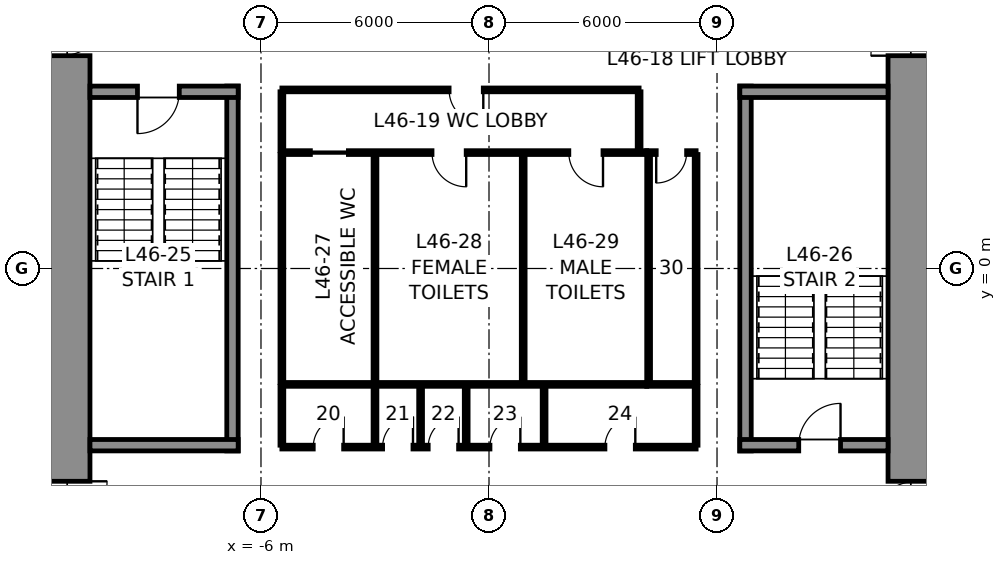
"""IFC4 building model, lengths in metres.
Left out: names, types, materials, properties, quantities, classifications, styles, units other than length and angle.
Written with IfcOpenShell. Run it as: python <this file> out.ifc"""

import sys

from ifc_helpers import new_model, si_unit, direction, frame, frame_2d, origin, place, context, subcontext, project, spatial, rectangle, extrude, element, fill, save


model = new_model("IFC4")
c1 = context("Model", 3, precision=1e-05, world=origin(), true_north=direction((0.0, 1.0)))
c2 = subcontext(c1, "Body", "Model", "MODEL_VIEW")
j1 = project(units=[si_unit("LENGTHUNIT", "METRE"), si_unit("PLANEANGLEUNIT", "RADIAN")], contexts=[c1])
p1 = place(None, origin())
s1 = spatial("IfcSite", under=j1, at=p1, CompositionType="ELEMENT")
p2 = place(p1, origin())
s2 = spatial("IfcBuilding", under=s1, at=p2, CompositionType="ELEMENT")
p3 = place(p2, frame((0.0, 0.0, 213.8)))
s3 = spatial("IfcBuildingStorey", under=s2, at=p3, CompositionType="ELEMENT", Elevation=213.8)
p4 = place(p3, frame((11.25, 10.5, 0.0), z_axis=(0.0, 0.0, 1.0), x_axis=(0.0, -1.0, 0.0)))
e1 = element("IfcWall", 1, at=p4, inside=s3, PredefinedType="SHEAR", context=c2, shape_type="SweptSolid", body=[
    extrude(rectangle(XDim=21.0, YDim=1.5, at=frame_2d((10.5, 0.0))), origin(), (0.0, 0.0, 1.0), 4.0),
])
p5 = place(p4, frame((3.7, 0.0, 0.0)))
e2 = element("IfcOpeningElement", 2, at=p5, cuts=e1, PredefinedType="OPENING", context=c2, shape_type="SweptSolid", body=[
    extrude(rectangle(XDim=1.2, YDim=2.3, at=frame_2d((0.6, 1.15))), frame((0.0, 0.76, 0.0), z_axis=(0.0, -1.0, 0.0), x_axis=(1.0, 0.0, 0.0)), (0.0, 0.0, 1.0), 1.52),
])
p6 = place(p4, frame((16.1, 0.0, 0.0)))
e3 = element("IfcOpeningElement", 3, at=p6, cuts=e1, PredefinedType="OPENING", context=c2, shape_type="SweptSolid", body=[
    extrude(rectangle(XDim=1.2, YDim=2.3, at=frame_2d((0.6, 1.15))), frame((0.0, 0.76, 0.0), z_axis=(0.0, -1.0, 0.0), x_axis=(1.0, 0.0, 0.0)), (0.0, 0.0, 1.0), 1.52),
])
p7 = place(p3, frame((-11.25, -10.5, 0.0), z_axis=(0.0, 0.0, 1.0), x_axis=(0.0, 1.0, 0.0)))
e4 = element("IfcWall", 4, at=p7, inside=s3, PredefinedType="SHEAR", context=c2, shape_type="SweptSolid", body=[
    extrude(rectangle(XDim=21.0, YDim=1.5, at=frame_2d((10.5, 0.0))), origin(), (0.0, 0.0, 1.0), 4.0),
])
p8 = place(p7, frame((16.1, 0.0, 0.0)))
e5 = element("IfcOpeningElement", 5, at=p8, cuts=e4, PredefinedType="OPENING", context=c2, shape_type="SweptSolid", body=[
    extrude(rectangle(XDim=1.2, YDim=2.3, at=frame_2d((0.6, 1.15))), frame((0.0, 0.76, 0.0), z_axis=(0.0, -1.0, 0.0), x_axis=(1.0, 0.0, 0.0)), (0.0, 0.0, 1.0), 1.52),
])
p9 = place(p7, frame((3.7, 0.0, 0.0)))
e6 = element("IfcOpeningElement", 6, at=p9, cuts=e4, PredefinedType="OPENING", context=c2, shape_type="SweptSolid", body=[
    extrude(rectangle(XDim=1.2, YDim=2.3, at=frame_2d((0.6, 1.15))), frame((0.0, 0.76, 0.0), z_axis=(0.0, -1.0, 0.0), x_axis=(1.0, 0.0, 0.0)), (0.0, 0.0, 1.0), 1.52),
])
p10 = place(p3, frame((-6.75, -4.8, 0.0), z_axis=(0.0, 0.0, 1.0), x_axis=(0.0, 1.0, 0.0)))
e7 = element("IfcWall", 7, at=p10, inside=s3, PredefinedType="SOLIDWALL", context=c2, shape_type="SweptSolid", body=[
    extrude(rectangle(XDim=9.6, YDim=0.3, at=frame_2d((4.8, 0.0))), origin(), (0.0, 0.0, 1.0), 3.75),
])
p11 = place(p3, frame((-10.5, 4.65, 0.0), z_axis=(0.0, 0.0, 1.0), x_axis=(1.0, 0.0, 0.0)))
e8 = element("IfcWall", 8, at=p11, inside=s3, PredefinedType="SOLIDWALL", context=c2, shape_type="SweptSolid", body=[
    extrude(rectangle(XDim=3.9, YDim=0.3, at=frame_2d((1.95, 0.0))), origin(), (0.0, 0.0, 1.0), 3.75),
])
p12 = place(p11, frame((1.25, 0.0, 0.0)))
e9 = element("IfcOpeningElement", 9, at=p12, cuts=e8, PredefinedType="OPENING", context=c2, shape_type="SweptSolid", body=[
    extrude(rectangle(XDim=1.1, YDim=2.3, at=frame_2d((0.55, 1.15))), frame((0.0, 0.16, 0.0), z_axis=(0.0, -1.0, 0.0), x_axis=(1.0, 0.0, 0.0)), (0.0, 0.0, 1.0), 0.32),
])
p13 = place(p3, frame((-6.6, -4.65, 0.0), z_axis=(0.0, 0.0, 1.0), x_axis=(-1.0, 0.0, 0.0)))
e10 = element("IfcWall", 10, at=p13, inside=s3, PredefinedType="SOLIDWALL", context=c2, shape_type="SweptSolid", body=[
    extrude(rectangle(XDim=3.9, YDim=0.3, at=frame_2d((1.95, 0.0))), origin(), (0.0, 0.0, 1.0), 3.75),
])
p14 = place(p3, frame((6.75, -4.8, 0.0), z_axis=(0.0, 0.0, 1.0), x_axis=(0.0, 1.0, 0.0)))
e11 = element("IfcWall", 11, at=p14, inside=s3, PredefinedType="SOLIDWALL", context=c2, shape_type="SweptSolid", body=[
    extrude(rectangle(XDim=9.6, YDim=0.3, at=frame_2d((4.8, 0.0))), origin(), (0.0, 0.0, 1.0), 3.75),
])
p15 = place(p3, frame((6.6, 4.65, 0.0), z_axis=(0.0, 0.0, 1.0), x_axis=(1.0, 0.0, 0.0)))
e12 = element("IfcWall", 12, at=p15, inside=s3, PredefinedType="SOLIDWALL", context=c2, shape_type="SweptSolid", body=[
    extrude(rectangle(XDim=3.9, YDim=0.3, at=frame_2d((1.95, 0.0))), origin(), (0.0, 0.0, 1.0), 3.75),
])
p16 = place(p3, frame((10.5, -4.65, 0.0), z_axis=(0.0, 0.0, 1.0), x_axis=(-1.0, 0.0, 0.0)))
e13 = element("IfcWall", 13, at=p16, inside=s3, PredefinedType="SOLIDWALL", context=c2, shape_type="SweptSolid", body=[
    extrude(rectangle(XDim=3.9, YDim=0.3, at=frame_2d((1.95, 0.0))), origin(), (0.0, 0.0, 1.0), 3.75),
])
p17 = place(p16, frame((1.25, 0.0, 0.0)))
e14 = element("IfcOpeningElement", 14, at=p17, cuts=e13, PredefinedType="OPENING", context=c2, shape_type="SweptSolid", body=[
    extrude(rectangle(XDim=1.1, YDim=2.3, at=frame_2d((0.55, 1.15))), frame((0.0, 0.16, 0.0), z_axis=(0.0, -1.0, 0.0), x_axis=(1.0, 0.0, 0.0)), (0.0, 0.0, 1.0), 0.32),
])
p18 = place(p3, frame((-5.45, 3.05, 0.0), z_axis=(0.0, 0.0, 1.0), x_axis=(1.0, 0.0, 0.0)))
e15 = element("IfcWall", 15, at=p18, inside=s3, PredefinedType="PARTITIONING", context=c2, shape_type="SweptSolid", body=[
    extrude(rectangle(XDim=9.6, YDim=0.1, at=frame_2d((4.8, 0.0))), origin(), (0.0, 0.0, 1.0), 3.75),
])
p19 = place(p18, frame((0.75, 0.0, 0.0)))
e16 = element("IfcOpeningElement", 16, at=p19, cuts=e15, PredefinedType="OPENING", context=c2, shape_type="SweptSolid", body=[
    extrude(rectangle(XDim=1.0, YDim=2.3, at=frame_2d((0.5, 1.15))), frame((0.0, 0.06, 0.0), z_axis=(0.0, -1.0, 0.0), x_axis=(1.0, 0.0, 0.0)), (0.0, 0.0, 1.0), 0.12),
])
p20 = place(p18, frame((3.95, 0.0, 0.0)))
e17 = element("IfcOpeningElement", 17, at=p20, cuts=e15, PredefinedType="OPENING", context=c2, shape_type="SweptSolid", body=[
    extrude(rectangle(XDim=0.9, YDim=2.3, at=frame_2d((0.45, 1.15))), frame((0.0, 0.06, 0.0), z_axis=(0.0, -1.0, 0.0), x_axis=(1.0, 0.0, 0.0)), (0.0, 0.0, 1.0), 0.12),
])
p21 = place(p18, frame((7.55, 0.0, 0.0)))
e18 = element("IfcOpeningElement", 18, at=p21, cuts=e15, PredefinedType="OPENING", context=c2, shape_type="SweptSolid", body=[
    extrude(rectangle(XDim=0.9, YDim=2.3, at=frame_2d((0.45, 1.15))), frame((0.0, 0.06, 0.0), z_axis=(0.0, -1.0, 0.0), x_axis=(1.0, 0.0, 0.0)), (0.0, 0.0, 1.0), 0.12),
])
p22 = place(p3, frame((4.15, 3.05, 0.0), z_axis=(0.0, 0.0, 1.0), x_axis=(1.0, 0.0, 0.0)))
e19 = element("IfcWall", 19, at=p22, inside=s3, PredefinedType="PARTITIONING", context=c2, shape_type="SweptSolid", body=[
    extrude(rectangle(XDim=1.3, YDim=0.1, at=frame_2d((0.65, 0.0))), origin(), (0.0, 0.0, 1.0), 3.75),
])
p23 = place(p22, frame((0.25, 0.0, 0.0)))
e20 = element("IfcOpeningElement", 20, at=p23, cuts=e19, PredefinedType="OPENING", context=c2, shape_type="SweptSolid", body=[
    extrude(rectangle(XDim=0.8, YDim=2.3, at=frame_2d((0.4, 1.15))), frame((0.0, 0.06, 0.0), z_axis=(0.0, -1.0, 0.0), x_axis=(1.0, 0.0, 0.0)), (0.0, 0.0, 1.0), 0.12),
])
p24 = place(p3, frame((4.15, -3.05, 0.0), z_axis=(0.0, 0.0, 1.0), x_axis=(-1.0, 0.0, 0.0)))
e21 = element("IfcWall", 21, at=p24, inside=s3, PredefinedType="PARTITIONING", context=c2, shape_type="SweptSolid", body=[
    extrude(rectangle(XDim=9.6, YDim=0.1, at=frame_2d((4.8, 0.0))), origin(), (0.0, 0.0, 1.0), 3.75),
])
p25 = place(p3, frame((5.45, -3.05, 0.0), z_axis=(0.0, 0.0, 1.0), x_axis=(-1.0, 0.0, 0.0)))
e22 = element("IfcWall", 22, at=p25, inside=s3, PredefinedType="PARTITIONING", context=c2, shape_type="SweptSolid", body=[
    extrude(rectangle(XDim=1.3, YDim=0.1, at=frame_2d((0.65, 0.0))), origin(), (0.0, 0.0, 1.0), 3.75),
])
for number, where, z_axis, x_axis in (
    (23, (5.45, 3.0, 0.0), (0.0, 0.0, 1.0), (0.0, -1.0, 0.0)),
    (24, (-5.45, -3.0, 0.0), (0.0, 0.0, 1.0), (0.0, 1.0, 0.0)),
    (25, (-3.0, -3.0, 0.0), (0.0, 0.0, 1.0), (0.0, 1.0, 0.0)),
    (26, (0.9, -3.0, 0.0), (0.0, 0.0, 1.0), (0.0, 1.0, 0.0)),
    (27, (4.2, -3.0, 0.0), (0.0, 0.0, 1.0), (0.0, 1.0, 0.0)),
):
    element("IfcWall", number, at=place(p3, frame(where, z_axis=z_axis, x_axis=x_axis)), inside=s3, PredefinedType="PARTITIONING", context=c2, shape_type="SweptSolid", body=[
        extrude(rectangle(XDim=6.0, YDim=0.1, at=frame_2d((3.0, 0.0))), origin(), (0.0, 0.0, 1.0), 3.75),
    ])
p26 = place(p3, frame((-5.45, 4.7, 0.0), z_axis=(0.0, 0.0, 1.0), x_axis=(1.0, 0.0, 0.0)))
e28 = element("IfcWall", 28, at=p26, inside=s3, PredefinedType="PARTITIONING", context=c2, shape_type="SweptSolid", body=[
    extrude(rectangle(XDim=9.4, YDim=0.1, at=frame_2d((4.7, 0.0))), origin(), (0.0, 0.0, 1.0), 3.75),
])
p27 = place(p26, frame((4.4, 0.0, 0.0)))
e29 = element("IfcOpeningElement", 29, at=p27, cuts=e28, PredefinedType="OPENING", context=c2, shape_type="SweptSolid", body=[
    extrude(rectangle(XDim=0.9, YDim=2.3, at=frame_2d((0.45, 1.15))), frame((0.0, 0.06, 0.0), z_axis=(0.0, -1.0, 0.0), x_axis=(1.0, 0.0, 0.0)), (0.0, 0.0, 1.0), 0.12),
])
for number, where, z_axis, x_axis in (
    (30, (-5.45, 3.1, 0.0), (0.0, 0.0, 1.0), (0.0, 1.0, 0.0)),
    (31, (3.95, 3.1, 0.0), (0.0, 0.0, 1.0), (0.0, 1.0, 0.0)),
):
    element("IfcWall", number, at=place(p3, frame(where, z_axis=z_axis, x_axis=x_axis)), inside=s3, PredefinedType="PARTITIONING", context=c2, shape_type="SweptSolid", body=[
        extrude(rectangle(XDim=1.55, YDim=0.1, at=frame_2d((0.775, 0.0))), origin(), (0.0, 0.0, 1.0), 3.75),
    ])
p28 = place(p3, frame((5.45, -4.7, 0.0), z_axis=(0.0, 0.0, 1.0), x_axis=(-1.0, 0.0, 0.0)))
e32 = element("IfcWall", 32, at=p28, inside=s3, PredefinedType="PARTITIONING", context=c2, shape_type="SweptSolid", body=[
    extrude(rectangle(XDim=10.9, YDim=0.1, at=frame_2d((5.45, 0.0))), origin(), (0.0, 0.0, 1.0), 3.75),
])
p29 = place(p28, frame((9.275, 0.0, 0.0)))
e33 = element("IfcOpeningElement", 33, at=p29, cuts=e32, PredefinedType="OPENING", context=c2, shape_type="SweptSolid", body=[
    extrude(rectangle(XDim=0.8, YDim=2.3, at=frame_2d((0.4, 1.15))), frame((0.0, 0.06, 0.0), z_axis=(0.0, -1.0, 0.0), x_axis=(1.0, 0.0, 0.0)), (0.0, 0.0, 1.0), 0.12),
])
p30 = place(p28, frame((7.45, 0.0, 0.0)))
e34 = element("IfcOpeningElement", 34, at=p30, cuts=e32, PredefinedType="OPENING", context=c2, shape_type="SweptSolid", body=[
    extrude(rectangle(XDim=0.8, YDim=2.3, at=frame_2d((0.4, 1.15))), frame((0.0, 0.06, 0.0), z_axis=(0.0, -1.0, 0.0), x_axis=(1.0, 0.0, 0.0)), (0.0, 0.0, 1.0), 0.12),
])
p31 = place(p28, frame((6.25, 0.0, 0.0)))
e35 = element("IfcOpeningElement", 35, at=p31, cuts=e32, PredefinedType="OPENING", context=c2, shape_type="SweptSolid", body=[
    extrude(rectangle(XDim=0.8, YDim=2.3, at=frame_2d((0.4, 1.15))), frame((0.0, 0.06, 0.0), z_axis=(0.0, -1.0, 0.0), x_axis=(1.0, 0.0, 0.0)), (0.0, 0.0, 1.0), 0.12),
])
p32 = place(p28, frame((4.625, 0.0, 0.0)))
e36 = element("IfcOpeningElement", 36, at=p32, cuts=e32, PredefinedType="OPENING", context=c2, shape_type="SweptSolid", body=[
    extrude(rectangle(XDim=0.8, YDim=2.3, at=frame_2d((0.4, 1.15))), frame((0.0, 0.06, 0.0), z_axis=(0.0, -1.0, 0.0), x_axis=(1.0, 0.0, 0.0)), (0.0, 0.0, 1.0), 0.12),
])
p33 = place(p28, frame((1.6, 0.0, 0.0)))
e37 = element("IfcOpeningElement", 37, at=p33, cuts=e32, PredefinedType="OPENING", context=c2, shape_type="SweptSolid", body=[
    extrude(rectangle(XDim=0.8, YDim=2.3, at=frame_2d((0.4, 1.15))), frame((0.0, 0.06, 0.0), z_axis=(0.0, -1.0, 0.0), x_axis=(1.0, 0.0, 0.0)), (0.0, 0.0, 1.0), 0.12),
])
for number, where, z_axis, x_axis in (
    (38, (-5.45, -3.1, 0.0), (0.0, 0.0, 1.0), (0.0, -1.0, 0.0)),
    (39, (5.45, -3.1, 0.0), (0.0, 0.0, 1.0), (0.0, -1.0, 0.0)),
    (40, (-3.0, -3.1, 0.0), (0.0, 0.0, 1.0), (0.0, -1.0, 0.0)),
    (41, (-1.8, -3.1, 0.0), (0.0, 0.0, 1.0), (0.0, -1.0, 0.0)),
    (42, (-0.6, -3.1, 0.0), (0.0, 0.0, 1.0), (0.0, -1.0, 0.0)),
    (43, (1.45, -3.1, 0.0), (0.0, 0.0, 1.0), (0.0, -1.0, 0.0)),
):
    element("IfcWall", number, at=place(p3, frame(where, z_axis=z_axis, x_axis=x_axis)), inside=s3, PredefinedType="PARTITIONING", context=c2, shape_type="SweptSolid", body=[
        extrude(rectangle(XDim=1.55, YDim=0.1, at=frame_2d((0.775, 0.0))), origin(), (0.0, 0.0, 1.0), 3.75),
    ])
p34 = place(p12, frame((1.1, 0.0, 0.0), z_axis=(0.0, 0.0, 1.0), x_axis=(-1.0, 0.0, 0.0)))
e44 = element("IfcDoor", 44, at=p34, inside=s3, OperationType="SINGLE_SWING_RIGHT", PredefinedType="DOOR", context=c2, shape_type="SweptSolid", body=[
    extrude(rectangle(XDim=1.1, YDim=2.3, at=frame_2d((0.55, 1.15))), frame((0.0, 0.025, 0.0), z_axis=(0.0, -1.0, 0.0), x_axis=(1.0, 0.0, 0.0)), (0.0, 0.0, 1.0), 0.05),
])
fill(e9, e44)
p35 = place(p17, frame((1.1, 0.0, 0.0), z_axis=(0.0, 0.0, 1.0), x_axis=(-1.0, 0.0, 0.0)))
e45 = element("IfcDoor", 45, at=p35, inside=s3, OperationType="SINGLE_SWING_RIGHT", PredefinedType="DOOR", context=c2, shape_type="SweptSolid", body=[
    extrude(rectangle(XDim=1.1, YDim=2.3, at=frame_2d((0.55, 1.15))), frame((0.0, 0.025, 0.0), z_axis=(0.0, -1.0, 0.0), x_axis=(1.0, 0.0, 0.0)), (0.0, 0.0, 1.0), 0.05),
])
fill(e14, e45)
p36 = place(p19, frame((1.0, 0.0, 0.0), z_axis=(0.0, 0.0, 1.0), x_axis=(-1.0, 0.0, 0.0)))
e46 = element("IfcDoor", 46, at=p36, inside=s3, OperationType="SLIDING_TO_LEFT", PredefinedType="DOOR", context=c2, shape_type="SweptSolid", body=[
    extrude(rectangle(XDim=1.0, YDim=2.3, at=frame_2d((0.5, 1.15))), frame((0.0, 0.025, 0.0), z_axis=(0.0, -1.0, 0.0), x_axis=(1.0, 0.0, 0.0)), (0.0, 0.0, 1.0), 0.05),
])
fill(e16, e46)
p37 = place(p20, frame((0.9, 0.0, 0.0), z_axis=(0.0, 0.0, 1.0), x_axis=(-1.0, 0.0, 0.0)))
e47 = element("IfcDoor", 47, at=p37, inside=s3, OperationType="SINGLE_SWING_LEFT", PredefinedType="DOOR", context=c2, shape_type="SweptSolid", body=[
    extrude(rectangle(XDim=0.9, YDim=2.3, at=frame_2d((0.45, 1.15))), frame((0.0, 0.025, 0.0), z_axis=(0.0, -1.0, 0.0), x_axis=(1.0, 0.0, 0.0)), (0.0, 0.0, 1.0), 0.05),
])
fill(e17, e47)
p38 = place(p21, frame((0.9, 0.0, 0.0), z_axis=(0.0, 0.0, 1.0), x_axis=(-1.0, 0.0, 0.0)))
e48 = element("IfcDoor", 48, at=p38, inside=s3, OperationType="SINGLE_SWING_LEFT", PredefinedType="DOOR", context=c2, shape_type="SweptSolid", body=[
    extrude(rectangle(XDim=0.9, YDim=2.3, at=frame_2d((0.45, 1.15))), frame((0.0, 0.025, 0.0), z_axis=(0.0, -1.0, 0.0), x_axis=(1.0, 0.0, 0.0)), (0.0, 0.0, 1.0), 0.05),
])
fill(e18, e48)
p39 = place(p23, frame((0.8, 0.0, 0.0), z_axis=(0.0, 0.0, 1.0), x_axis=(-1.0, 0.0, 0.0)))
e49 = element("IfcDoor", 49, at=p39, inside=s3, OperationType="SINGLE_SWING_RIGHT", PredefinedType="DOOR", context=c2, shape_type="SweptSolid", body=[
    extrude(rectangle(XDim=0.8, YDim=2.3, at=frame_2d((0.4, 1.15))), frame((0.0, 0.025, 0.0), z_axis=(0.0, -1.0, 0.0), x_axis=(1.0, 0.0, 0.0)), (0.0, 0.0, 1.0), 0.05),
])
fill(e20, e49)
p40 = place(p27, frame((0.9, 0.0, 0.0), z_axis=(0.0, 0.0, 1.0), x_axis=(-1.0, 0.0, 0.0)))
e50 = element("IfcDoor", 50, at=p40, inside=s3, OperationType="SINGLE_SWING_LEFT", PredefinedType="DOOR", context=c2, shape_type="SweptSolid", body=[
    extrude(rectangle(XDim=0.9, YDim=2.3, at=frame_2d((0.45, 1.15))), frame((0.0, 0.025, 0.0), z_axis=(0.0, -1.0, 0.0), x_axis=(1.0, 0.0, 0.0)), (0.0, 0.0, 1.0), 0.05),
])
fill(e29, e50)
p41 = place(p29, frame((0.8, 0.0, 0.0), z_axis=(0.0, 0.0, 1.0), x_axis=(-1.0, 0.0, 0.0)))
e51 = element("IfcDoor", 51, at=p41, inside=s3, OperationType="SINGLE_SWING_RIGHT", PredefinedType="DOOR", context=c2, shape_type="SweptSolid", body=[
    extrude(rectangle(XDim=0.8, YDim=2.3, at=frame_2d((0.4, 1.15))), frame((0.0, 0.025, 0.0), z_axis=(0.0, -1.0, 0.0), x_axis=(1.0, 0.0, 0.0)), (0.0, 0.0, 1.0), 0.05),
])
fill(e33, e51)
p42 = place(p30, frame((0.8, 0.0, 0.0), z_axis=(0.0, 0.0, 1.0), x_axis=(-1.0, 0.0, 0.0)))
e52 = element("IfcDoor", 52, at=p42, inside=s3, OperationType="SINGLE_SWING_RIGHT", PredefinedType="DOOR", context=c2, shape_type="SweptSolid", body=[
    extrude(rectangle(XDim=0.8, YDim=2.3, at=frame_2d((0.4, 1.15))), frame((0.0, 0.025, 0.0), z_axis=(0.0, -1.0, 0.0), x_axis=(1.0, 0.0, 0.0)), (0.0, 0.0, 1.0), 0.05),
])
fill(e34, e52)
p43 = place(p31, frame((0.8, 0.0, 0.0), z_axis=(0.0, 0.0, 1.0), x_axis=(-1.0, 0.0, 0.0)))
e53 = element("IfcDoor", 53, at=p43, inside=s3, OperationType="SINGLE_SWING_RIGHT", PredefinedType="DOOR", context=c2, shape_type="SweptSolid", body=[
    extrude(rectangle(XDim=0.8, YDim=2.3, at=frame_2d((0.4, 1.15))), frame((0.0, 0.025, 0.0), z_axis=(0.0, -1.0, 0.0), x_axis=(1.0, 0.0, 0.0)), (0.0, 0.0, 1.0), 0.05),
])
fill(e35, e53)
p44 = place(p32, frame((0.8, 0.0, 0.0), z_axis=(0.0, 0.0, 1.0), x_axis=(-1.0, 0.0, 0.0)))
e54 = element("IfcDoor", 54, at=p44, inside=s3, OperationType="SINGLE_SWING_RIGHT", PredefinedType="DOOR", context=c2, shape_type="SweptSolid", body=[
    extrude(rectangle(XDim=0.8, YDim=2.3, at=frame_2d((0.4, 1.15))), frame((0.0, 0.025, 0.0), z_axis=(0.0, -1.0, 0.0), x_axis=(1.0, 0.0, 0.0)), (0.0, 0.0, 1.0), 0.05),
])
fill(e36, e54)
p45 = place(p33, frame((0.8, 0.0, 0.0), z_axis=(0.0, 0.0, 1.0), x_axis=(-1.0, 0.0, 0.0)))
e55 = element("IfcDoor", 55, at=p45, inside=s3, OperationType="SINGLE_SWING_RIGHT", PredefinedType="DOOR", context=c2, shape_type="SweptSolid", body=[
    extrude(rectangle(XDim=0.8, YDim=2.3, at=frame_2d((0.4, 1.15))), frame((0.0, 0.025, 0.0), z_axis=(0.0, -1.0, 0.0), x_axis=(1.0, 0.0, 0.0)), (0.0, 0.0, 1.0), 0.05),
])
fill(e37, e55)
p46 = place(p8, frame((1.2, 0.0, 0.0), z_axis=(0.0, 0.0, 1.0), x_axis=(-1.0, 0.0, 0.0)))
e56 = element("IfcDoor", 56, at=p46, inside=s3, OperationType="SINGLE_SWING_LEFT", PredefinedType="DOOR", context=c2, shape_type="SweptSolid", body=[
    extrude(rectangle(XDim=1.2, YDim=2.3, at=frame_2d((0.6, 1.15))), frame((0.0, 0.025, 0.0), z_axis=(0.0, -1.0, 0.0), x_axis=(1.0, 0.0, 0.0)), (0.0, 0.0, 1.0), 0.05),
])
fill(e5, e56)
p47 = place(p9, frame((1.2, 0.0, 0.0), z_axis=(0.0, 0.0, 1.0), x_axis=(-1.0, 0.0, 0.0)))
e57 = element("IfcDoor", 57, at=p47, inside=s3, OperationType="SINGLE_SWING_LEFT", PredefinedType="DOOR", context=c2, shape_type="SweptSolid", body=[
    extrude(rectangle(XDim=1.2, YDim=2.3, at=frame_2d((0.6, 1.15))), frame((0.0, 0.025, 0.0), z_axis=(0.0, -1.0, 0.0), x_axis=(1.0, 0.0, 0.0)), (0.0, 0.0, 1.0), 0.05),
])
fill(e6, e57)
p48 = place(p5, frame((1.2, 0.0, 0.0), z_axis=(0.0, 0.0, 1.0), x_axis=(-1.0, 0.0, 0.0)))
e58 = element("IfcDoor", 58, at=p48, inside=s3, OperationType="SINGLE_SWING_LEFT", PredefinedType="DOOR", context=c2, shape_type="SweptSolid", body=[
    extrude(rectangle(XDim=1.2, YDim=2.3, at=frame_2d((0.6, 1.15))), frame((0.0, 0.025, 0.0), z_axis=(0.0, -1.0, 0.0), x_axis=(1.0, 0.0, 0.0)), (0.0, 0.0, 1.0), 0.05),
])
fill(e2, e58)
p49 = place(p6, frame((1.2, 0.0, 0.0), z_axis=(0.0, 0.0, 1.0), x_axis=(-1.0, 0.0, 0.0)))
e59 = element("IfcDoor", 59, at=p49, inside=s3, OperationType="SINGLE_SWING_LEFT", PredefinedType="DOOR", context=c2, shape_type="SweptSolid", body=[
    extrude(rectangle(XDim=1.2, YDim=2.3, at=frame_2d((0.6, 1.15))), frame((0.0, 0.025, 0.0), z_axis=(0.0, -1.0, 0.0), x_axis=(1.0, 0.0, 0.0)), (0.0, 0.0, 1.0), 0.05),
])
fill(e3, e59)
save(model, sys.argv[1])
